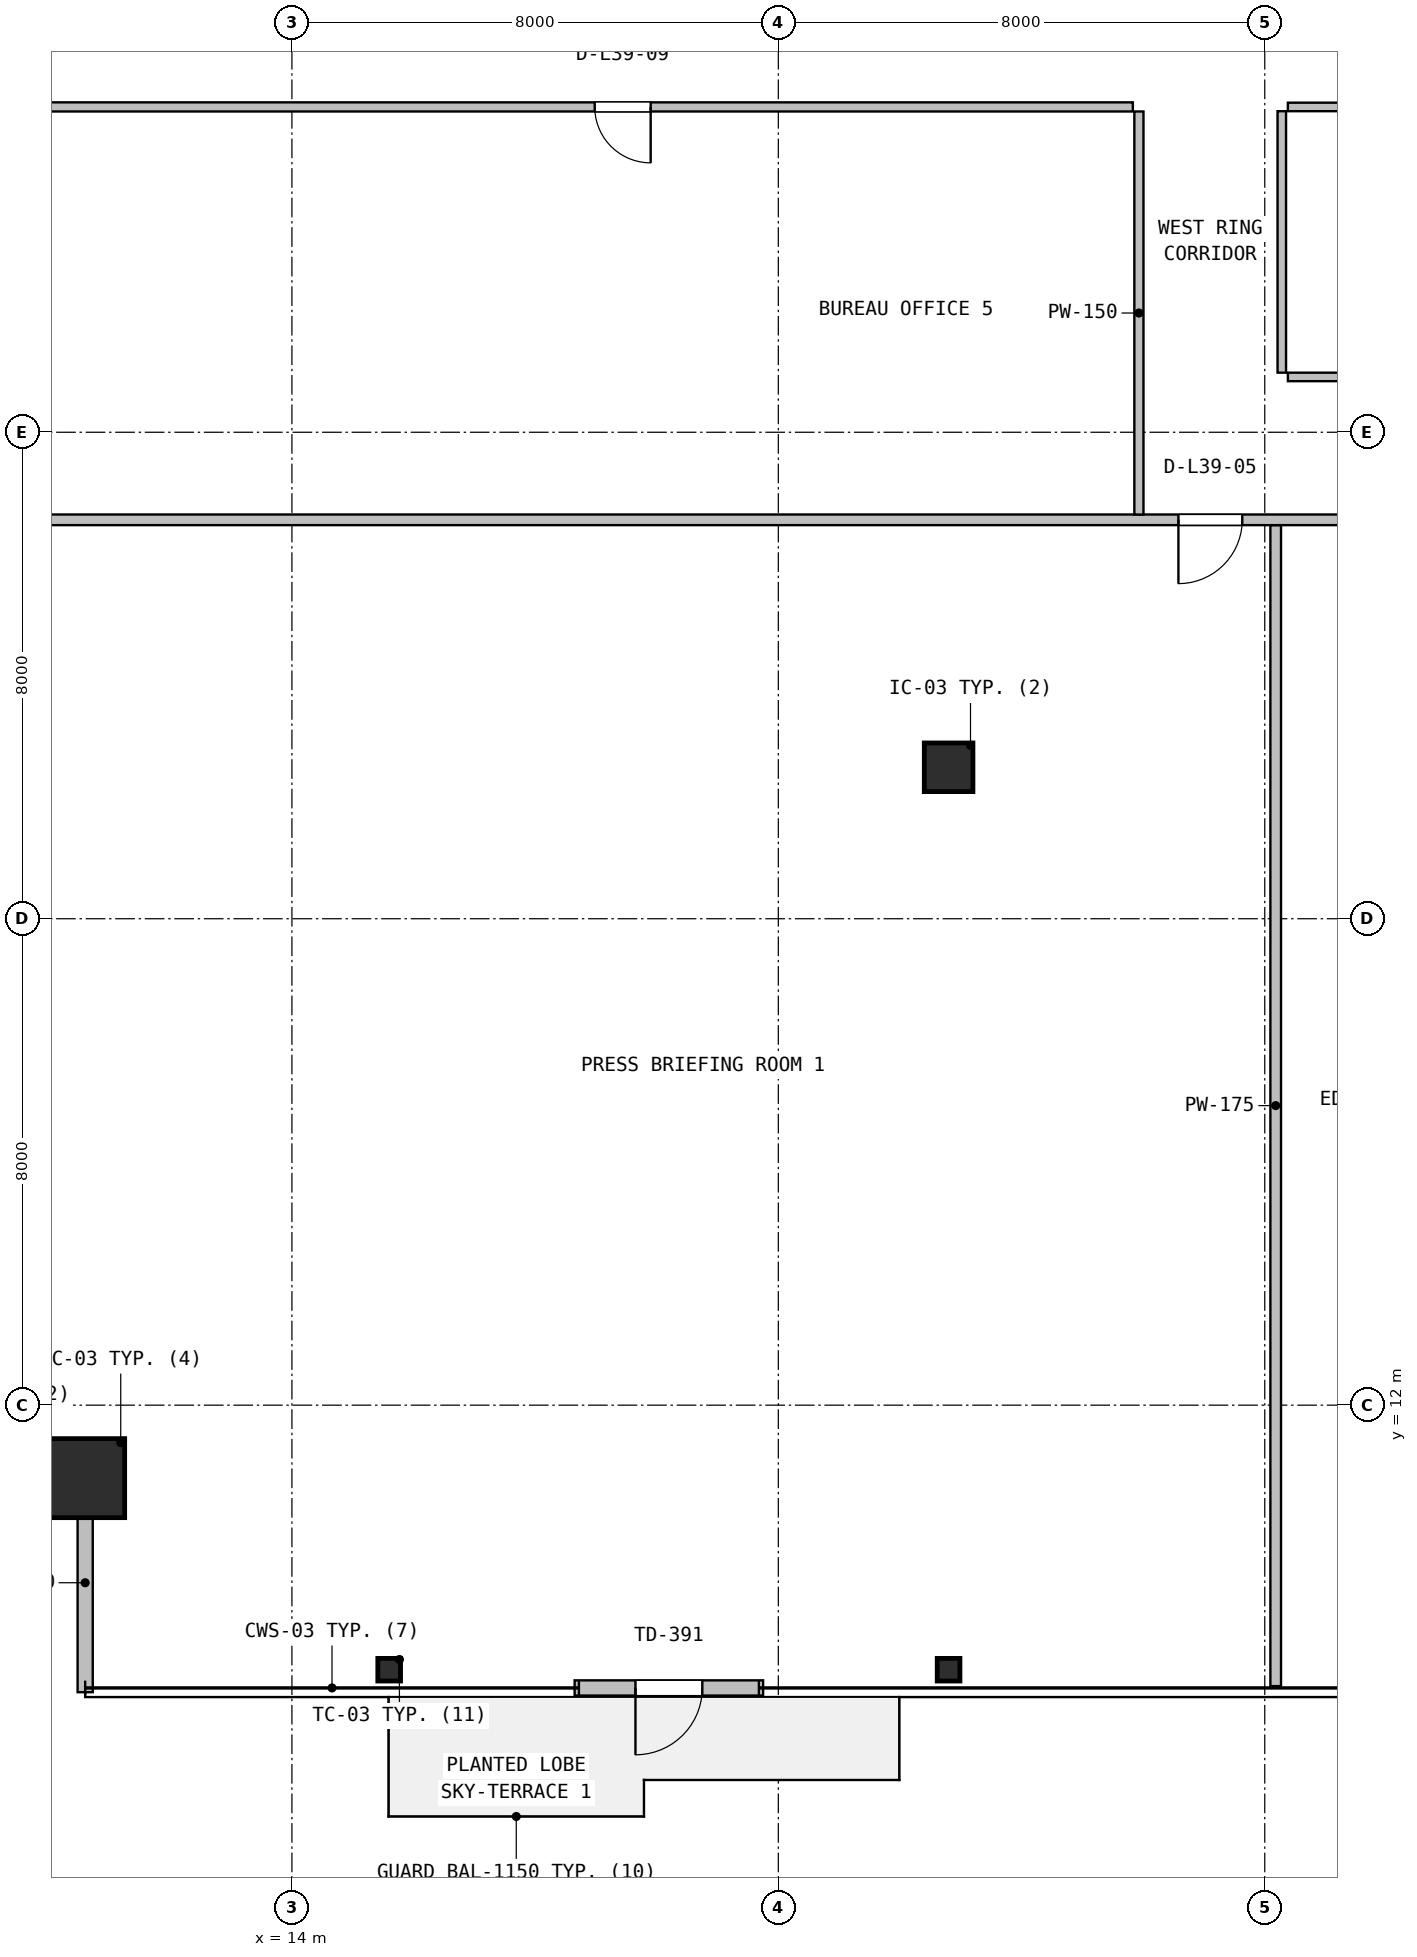
"""IFC4 building model, lengths in metres.
Left out: names, types, materials, properties, quantities, classifications, styles, units other than length and angle.
Written with IfcOpenShell. Run it as: python <this file> out.ifc"""

import sys

from ifc_helpers import new_model, si_unit, direction, frame, frame_2d, origin, origin_2d, place, context, subcontext, project, spatial, rectangle, hollow_rectangle, i_section, extrude, source, transform, mapped, element, fill, save


model = new_model("IFC4")
c1 = context("Model", 3, precision=1e-05, world=origin(), true_north=direction((0.0, 1.0)))
c2 = subcontext(c1, "Body", "Model", "MODEL_VIEW")
j1 = project(units=[si_unit("LENGTHUNIT", "METRE"), si_unit("PLANEANGLEUNIT", "RADIAN")], contexts=[c1])
p1 = place(None, origin())
s1 = spatial("IfcSite", under=j1, at=p1, CompositionType="ELEMENT")
p2 = place(p1, origin())
s2 = spatial("IfcBuilding", under=s1, at=p2, CompositionType="ELEMENT")
p3 = place(p2, frame((0.0, 0.0, 161.0)))
s3 = spatial("IfcBuildingStorey", under=s2, at=p3, CompositionType="ELEMENT", Elevation=161.0)
m1 = source(origin(), c2, "Body", "SweptSolid", [
    extrude(hollow_rectangle(XDim=1.3, YDim=1.3, WallThickness=0.05, at=origin_2d()), origin(), (0.0, 0.0, 1.0), 3.8),
])
p4 = place(p3, frame((10.6, 10.8, 0.0), z_axis=(0.0, 0.0, 1.0), x_axis=(1.0, 0.0, 0.0)))
e1 = element("IfcColumn", 1, at=p4, inside=s3, PredefinedType="COLUMN", context=c2, shape_type="MappedRepresentation", body=[
    mapped(m1, transform((0.0, 0.0, 0.0), x_axis=(1.0, 0.0, 0.0), y_axis=(0.0, 1.0, 0.0), z_axis=(0.0, 0.0, 1.0), scale=1.0)),
])
m2 = source(origin(), c2, "Body", "SweptSolid", [
    extrude(i_section(OverallWidth=0.374, OverallDepth=0.372, WebThickness=0.016, FlangeThickness=0.026, FilletRadius=0.016, at=origin_2d()), origin(), (0.0, 0.0, 1.0), 3.8),
])
for number, where, z_axis, x_axis in (
    (2, (15.6, 7.65, 0.0), (0.0, 0.0, 1.0), (1.0, 0.0, 0.0)),
    (3, (24.8, 7.65, 0.0), (0.0, 0.0, 1.0), (1.0, 0.0, 0.0)),
):
    element("IfcColumn", number, at=place(p3, frame(where, z_axis=z_axis, x_axis=x_axis)), inside=s3, PredefinedType="COLUMN", context=c2, shape_type="MappedRepresentation", body=[
        mapped(m2, transform((0.0, 0.0, 0.0), x_axis=(1.0, 0.0, 0.0), y_axis=(0.0, 1.0, 0.0), z_axis=(0.0, 0.0, 1.0), scale=1.0)),
    ])
m3 = source(origin(), c2, "Body", "SweptSolid", [
    extrude(rectangle(XDim=0.8, YDim=0.8, at=origin_2d()), origin(), (0.0, 0.0, 1.0), 3.8),
])
p5 = place(p3, frame((24.8, 22.49, 0.0), z_axis=(0.0, 0.0, 1.0), x_axis=(1.0, 0.0, 0.0)))
e4 = element("IfcColumn", 4, at=p5, inside=s3, PredefinedType="COLUMN", context=c2, shape_type="MappedRepresentation", body=[
    mapped(m3, transform((0.0, 0.0, 0.0), x_axis=(1.0, 0.0, 0.0), y_axis=(0.0, 1.0, 0.0), z_axis=(0.0, 0.0, 1.0), scale=1.0)),
])
p6 = place(p3, frame((18.65, 7.35, 0.0), z_axis=(0.0, 0.0, 1.0), x_axis=(1.0, 0.0, 0.0)))
e5 = element("IfcWall", 5, at=p6, inside=s3, PredefinedType="SOLIDWALL", context=c2, shape_type="SweptSolid", body=[
    extrude(rectangle(XDim=3.1, YDim=0.25, at=frame_2d((1.55, 0.0))), origin(), (0.0, 0.0, 1.0), 3.53),
])
p7 = place(p6, frame((1.0, 0.0, 0.0)))
e6 = element("IfcOpeningElement", 6, at=p7, cuts=e5, PredefinedType="OPENING", context=c2, shape_type="SweptSolid", body=[
    extrude(rectangle(XDim=1.1, YDim=2.15, at=frame_2d((0.55, 1.075))), frame((0.0, 0.135, 0.0), z_axis=(0.0, -1.0, 0.0), x_axis=(1.0, 0.0, 0.0)), (0.0, 0.0, 1.0), 0.27),
])
p8 = place(p3, frame((10.6, 7.28, 0.0), z_axis=(0.0, 0.0, 1.0), x_axis=(0.0, 1.0, 0.0)))
e7 = element("IfcWall", 7, at=p8, inside=s3, PredefinedType="SOLIDWALL", context=c2, shape_type="SweptSolid", body=[
    extrude(rectangle(XDim=3.6, YDim=0.25, at=frame_2d((1.8, 0.0))), origin(), (0.0, 0.0, 1.0), 3.108),
])
p9 = place(p3, frame((30.18, 7.38, 0.0), z_axis=(0.0, 0.0, 1.0), x_axis=(0.0, 1.0, 0.0)))
e8 = element("IfcWall", 8, at=p9, inside=s3, PredefinedType="PARTITIONING", context=c2, shape_type="SweptSolid", body=[
    extrude(rectangle(XDim=19.093, YDim=0.175, at=frame_2d((9.546, 0.0))), origin(), (0.0, 0.0, 1.0), 2.909),
])
p10 = place(p3, frame((7.18, 26.56, 0.0), z_axis=(0.0, 0.0, 1.0), x_axis=(1.0, 0.0, 0.0)))
e9 = element("IfcWall", 9, at=p10, inside=s3, PredefinedType="PARTITIONING", context=c2, shape_type="SweptSolid", body=[
    extrude(rectangle(XDim=53.64, YDim=0.175, at=frame_2d((26.82, 0.0))), origin(), (0.0, 0.0, 1.0), 2.909),
])
p11 = place(p10, frame((21.4, 0.0, 0.0)))
e10 = element("IfcOpeningElement", 10, at=p11, cuts=e9, PredefinedType="OPENING", context=c2, shape_type="SweptSolid", body=[
    extrude(rectangle(XDim=1.05, YDim=2.1, at=frame_2d((0.525, 1.05))), frame((0.0, 0.098, 0.0), z_axis=(0.0, -1.0, 0.0), x_axis=(1.0, 0.0, 0.0)), (0.0, 0.0, 1.0), 0.195),
])
p12 = place(p10, frame((25.205, 0.0, 0.0)))
e11 = element("IfcOpeningElement", 11, at=p12, cuts=e9, PredefinedType="OPENING", context=c2, shape_type="SweptSolid", body=[
    extrude(rectangle(XDim=1.05, YDim=2.1, at=frame_2d((0.525, 1.05))), frame((0.0, 0.098, 0.0), z_axis=(0.0, -1.0, 0.0), x_axis=(1.0, 0.0, 0.0)), (0.0, 0.0, 1.0), 0.195),
])
p13 = place(p10, frame((29.825, 0.0, 0.0)))
e12 = element("IfcOpeningElement", 12, at=p13, cuts=e9, PredefinedType="OPENING", context=c2, shape_type="SweptSolid", body=[
    extrude(rectangle(XDim=1.4, YDim=2.12, at=frame_2d((0.7, 1.06))), frame((0.0, 0.098, 0.0), z_axis=(0.0, -1.0, 0.0), x_axis=(1.0, 0.0, 0.0)), (0.0, 0.0, 1.0), 0.195),
])
p14 = place(p10, frame((33.425, 0.0, 0.0)))
e13 = element("IfcOpeningElement", 13, at=p14, cuts=e9, PredefinedType="OPENING", context=c2, shape_type="SweptSolid", body=[
    extrude(rectangle(XDim=0.88, YDim=2.06, at=frame_2d((0.44, 1.03))), frame((0.0, 0.098, 0.0), z_axis=(0.0, -1.0, 0.0), x_axis=(1.0, 0.0, 0.0)), (0.0, 0.0, 1.0), 0.195),
])
p15 = place(p3, frame((27.93, 26.647, 0.0), z_axis=(0.0, 0.0, 1.0), x_axis=(0.0, 1.0, 0.0)))
e14 = element("IfcWall", 14, at=p15, inside=s3, PredefinedType="PARTITIONING", context=c2, shape_type="SweptSolid", body=[
    extrude(rectangle(XDim=6.628, YDim=0.15, at=frame_2d((3.314, 0.0))), origin(), (0.0, 0.0, 1.0), 3.222),
])
p16 = place(p3, frame((7.18, 33.35, 0.0), z_axis=(0.0, 0.0, 1.0), x_axis=(1.0, 0.0, 0.0)))
e15 = element("IfcWall", 15, at=p16, inside=s3, PredefinedType="PARTITIONING", context=c2, shape_type="SweptSolid", body=[
    extrude(rectangle(XDim=20.65, YDim=0.15, at=frame_2d((10.325, 0.0))), origin(), (0.0, 0.0, 1.0), 2.909),
])
p17 = place(p16, frame((11.8, 0.0, 0.0)))
e16 = element("IfcOpeningElement", 16, at=p17, cuts=e15, PredefinedType="OPENING", context=c2, shape_type="SweptSolid", body=[
    extrude(rectangle(XDim=0.92, YDim=2.08, at=frame_2d((0.46, 1.04))), frame((0.0, 0.085, 0.0), z_axis=(0.0, -1.0, 0.0), x_axis=(1.0, 0.0, 0.0)), (0.0, 0.0, 1.0), 0.17),
])
p18 = place(p3, frame((30.38, 28.91, 0.0), z_axis=(0.0, 0.0, 1.0), x_axis=(1.0, 0.0, 0.0)))
e17 = element("IfcWall", 17, at=p18, inside=s3, PredefinedType="PARTITIONING", context=c2, shape_type="SweptSolid", body=[
    extrude(rectangle(XDim=9.39, YDim=0.14, at=frame_2d((4.695, 0.0))), origin(), (0.0, 0.0, 1.0), 2.909),
])
p19 = place(p18, frame((2.03, 0.0, 0.0)))
e18 = element("IfcOpeningElement", 18, at=p19, cuts=e17, PredefinedType="OPENING", context=c2, shape_type="SweptSolid", body=[
    extrude(rectangle(XDim=1.0, YDim=2.1, at=frame_2d((0.5, 1.05))), frame((0.0, 0.08, 0.0), z_axis=(0.0, -1.0, 0.0), x_axis=(1.0, 0.0, 0.0)), (0.0, 0.0, 1.0), 0.16),
])
p20 = place(p3, frame((30.38, 33.35, 0.0), z_axis=(0.0, 0.0, 1.0), x_axis=(1.0, 0.0, 0.0)))
e19 = element("IfcWall", 19, at=p20, inside=s3, PredefinedType="PARTITIONING", context=c2, shape_type="SweptSolid", body=[
    extrude(rectangle(XDim=9.39, YDim=0.14, at=frame_2d((4.695, 0.0))), origin(), (0.0, 0.0, 1.0), 2.909),
])
p21 = place(p3, frame((30.28, 28.98, 0.0), z_axis=(0.0, 0.0, 1.0), x_axis=(0.0, 1.0, 0.0)))
e20 = element("IfcWall", 20, at=p21, inside=s3, PredefinedType="PARTITIONING", context=c2, shape_type="SweptSolid", body=[
    extrude(rectangle(XDim=4.3, YDim=0.14, at=frame_2d((2.15, 0.0))), origin(), (0.0, 0.0, 1.0), 3.222),
])
m4 = source(origin(), c2, "Body", "SweptSolid", [
    extrude(rectangle(XDim=1.1, YDim=2.15, at=frame_2d((0.55, 1.075))), frame((0.0, 0.025, 0.0), z_axis=(0.0, -1.0, 0.0), x_axis=(1.0, 0.0, 0.0)), (0.0, 0.0, 1.0), 0.05),
])
p22 = place(p7, frame((1.1, 0.0, 0.0), z_axis=(0.0, 0.0, 1.0), x_axis=(-1.0, 0.0, 0.0)))
e21 = element("IfcDoor", 21, at=p22, inside=s3, OperationType="SINGLE_SWING_LEFT", PredefinedType="DOOR", context=c2, shape_type="MappedRepresentation", body=[
    mapped(m4, transform((0.0, 0.0, 0.0), x_axis=(1.0, 0.0, 0.0), y_axis=(0.0, 1.0, 0.0), z_axis=(0.0, 0.0, 1.0), scale=1.0)),
])
fill(e6, e21)
m5 = source(origin(), c2, "Body", "SweptSolid", [
    extrude(rectangle(XDim=1.05, YDim=2.1, at=frame_2d((0.525, 1.05))), frame((0.0, 0.025, 0.0), z_axis=(0.0, -1.0, 0.0), x_axis=(1.0, 0.0, 0.0)), (0.0, 0.0, 1.0), 0.05),
])
p23 = place(p11, frame((1.05, 0.0, 0.0), z_axis=(0.0, 0.0, 1.0), x_axis=(-1.0, 0.0, 0.0)))
e22 = element("IfcDoor", 22, at=p23, inside=s3, OperationType="SINGLE_SWING_LEFT", PredefinedType="DOOR", context=c2, shape_type="MappedRepresentation", body=[
    mapped(m5, transform((0.0, 0.0, 0.0), x_axis=(1.0, 0.0, 0.0), y_axis=(0.0, 1.0, 0.0), z_axis=(0.0, 0.0, 1.0), scale=1.0)),
])
fill(e10, e22)
m6 = source(origin(), c2, "Body", "SweptSolid", [
    extrude(rectangle(XDim=0.92, YDim=2.08, at=frame_2d((0.46, 1.04))), frame((0.0, 0.025, 0.0), z_axis=(0.0, -1.0, 0.0), x_axis=(1.0, 0.0, 0.0)), (0.0, 0.0, 1.0), 0.05),
])
p24 = place(p17, frame((0.92, 0.0, 0.0), z_axis=(0.0, 0.0, 1.0), x_axis=(-1.0, 0.0, 0.0)))
e23 = element("IfcDoor", 23, at=p24, inside=s3, OperationType="SINGLE_SWING_RIGHT", PredefinedType="DOOR", context=c2, shape_type="MappedRepresentation", body=[
    mapped(m6, transform((0.0, 0.0, 0.0), x_axis=(1.0, 0.0, 0.0), y_axis=(0.0, 1.0, 0.0), z_axis=(0.0, 0.0, 1.0), scale=1.0)),
])
fill(e16, e23)
save(model, sys.argv[1])
